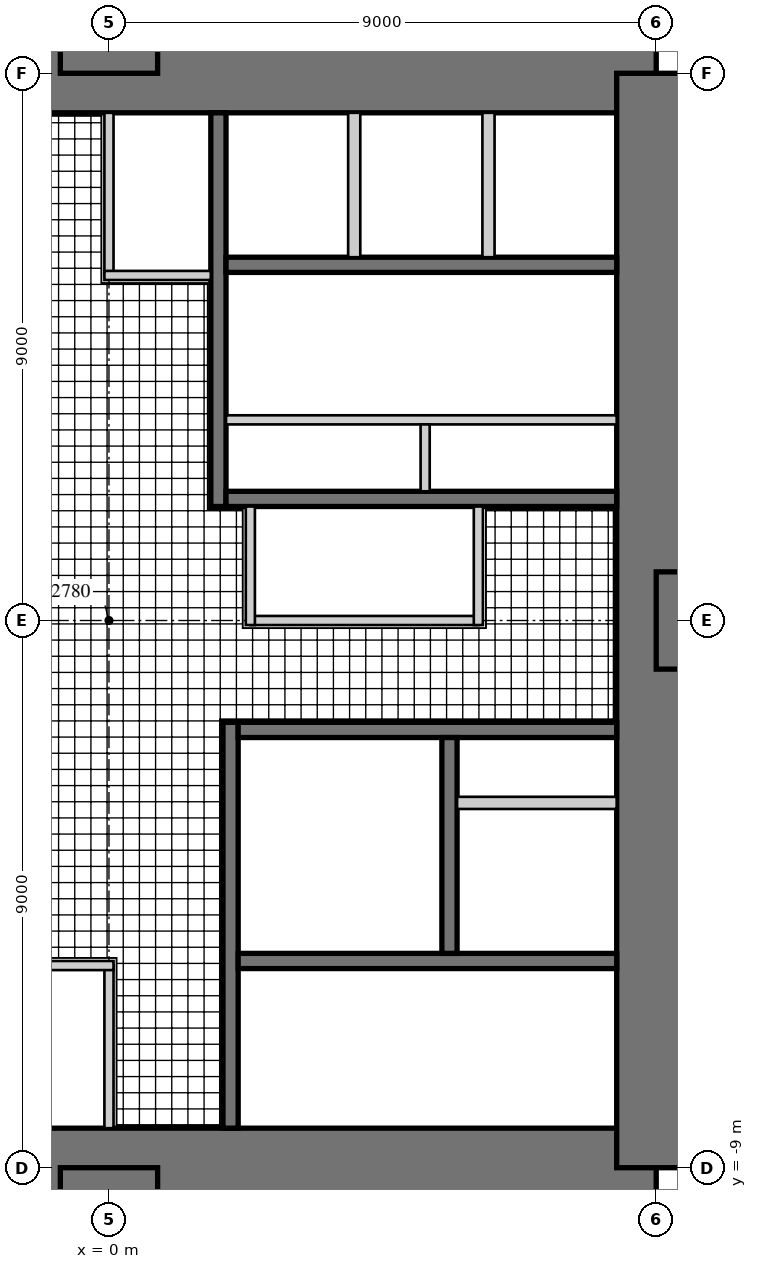
"""IFC4 building model, lengths in metres.
Left out: names, types, materials, properties, quantities, classifications, styles, units other than length and angle.
Written with IfcOpenShell. Run it as: python <this file> out.ifc"""

import sys

from ifc_helpers import new_model, si_unit, direction, frame, frame_2d, origin, place, context, subcontext, project, spatial, rectangle, extrude, element, fill, save


model = new_model("IFC4")
c1 = context("Model", 3, precision=1e-05, world=origin(), true_north=direction((0.0, 1.0)))
c2 = subcontext(c1, "Body", "Model", "MODEL_VIEW")
j1 = project(units=[si_unit("LENGTHUNIT", "METRE"), si_unit("PLANEANGLEUNIT", "RADIAN")], contexts=[c1])
p1 = place(None, origin())
s1 = spatial("IfcSite", under=j1, at=p1, CompositionType="ELEMENT")
p2 = place(p1, origin())
s2 = spatial("IfcBuilding", under=s1, at=p2, CompositionType="ELEMENT")
p3 = place(p2, frame((0.0, 0.0, 27.5)))
s3 = spatial("IfcBuildingStorey", under=s2, at=p3, CompositionType="ELEMENT", Elevation=27.5)
p4 = place(p3, frame((9.0, 9.0, 0.0), z_axis=(0.0, 0.0, 1.0), x_axis=(-1.0, 0.0, 0.0)))
e1 = element("IfcWall", 1, at=p4, inside=s3, PredefinedType="SHEAR", context=c2, shape_type="SweptSolid", body=[
    extrude(rectangle(XDim=18.0, YDim=1.3, at=frame_2d((9.0, 0.0))), origin(), (0.0, 0.0, 1.0), 4.0),
])
p5 = place(p4, frame((9.8, 0.0, 0.0)))
e2 = element("IfcOpeningElement", 2, at=p5, cuts=e1, PredefinedType="OPENING", context=c2, shape_type="SweptSolid", body=[
    extrude(rectangle(XDim=1.0, YDim=2.4, at=frame_2d((0.5, 1.2))), frame((0.0, 0.66, 0.0), z_axis=(0.0, -1.0, 0.0), x_axis=(1.0, 0.0, 0.0)), (0.0, 0.0, 1.0), 1.32),
])
p6 = place(p3, frame((-9.0, -9.0, 0.0), z_axis=(0.0, 0.0, 1.0), x_axis=(1.0, 0.0, 0.0)))
e3 = element("IfcWall", 3, at=p6, inside=s3, PredefinedType="SHEAR", context=c2, shape_type="SweptSolid", body=[
    extrude(rectangle(XDim=18.0, YDim=1.3, at=frame_2d((9.0, 0.0))), origin(), (0.0, 0.0, 1.0), 4.0),
])
p7 = place(p6, frame((9.8, 0.0, 0.0)))
e4 = element("IfcOpeningElement", 4, at=p7, cuts=e3, PredefinedType="OPENING", context=c2, shape_type="SweptSolid", body=[
    extrude(rectangle(XDim=1.0, YDim=2.4, at=frame_2d((0.5, 1.2))), frame((0.0, 0.66, 0.0), z_axis=(0.0, -1.0, 0.0), x_axis=(1.0, 0.0, 0.0)), (0.0, 0.0, 1.0), 1.32),
])
p8 = place(p3, frame((9.0, -9.0, 0.0), z_axis=(0.0, 0.0, 1.0), x_axis=(0.0, 1.0, 0.0)))
e5 = element("IfcWall", 5, at=p8, inside=s3, PredefinedType="SHEAR", context=c2, shape_type="SweptSolid", body=[
    extrude(rectangle(XDim=18.0, YDim=1.3, at=frame_2d((9.0, 0.0))), origin(), (0.0, 0.0, 1.0), 4.0),
])
p9 = place(p8, frame((9.8, 0.0, 0.0)))
e6 = element("IfcOpeningElement", 6, at=p9, cuts=e5, PredefinedType="OPENING", context=c2, shape_type="SweptSolid", body=[
    extrude(rectangle(XDim=1.0, YDim=2.4, at=frame_2d((0.5, 1.2))), frame((0.0, 0.66, 0.0), z_axis=(0.0, -1.0, 0.0), x_axis=(1.0, 0.0, 0.0)), (0.0, 0.0, 1.0), 1.32),
])
p10 = place(p3, frame((1.8, 1.875, 0.0), z_axis=(0.0, 0.0, 1.0), x_axis=(0.0, 1.0, 0.0)))
e7 = element("IfcWall", 7, at=p10, inside=s3, PredefinedType="SHEAR", context=c2, shape_type="SweptSolid", body=[
    extrude(rectangle(XDim=6.475, YDim=0.25, at=frame_2d((3.238, 0.0))), origin(), (0.0, 0.0, 1.0), 4.0),
])
p11 = place(p10, frame((1.875, 0.0, 0.0)))
e8 = element("IfcOpeningElement", 8, at=p11, cuts=e7, PredefinedType="OPENING", context=c2, shape_type="SweptSolid", body=[
    extrude(rectangle(XDim=1.6, YDim=2.4, at=frame_2d((0.8, 1.2))), frame((0.0, 0.135, 0.0), z_axis=(0.0, -1.0, 0.0), x_axis=(1.0, 0.0, 0.0)), (0.0, 0.0, 1.0), 0.27),
])
p12 = place(p3, frame((1.925, 2.0, 0.0), z_axis=(0.0, 0.0, 1.0), x_axis=(1.0, 0.0, 0.0)))
e9 = element("IfcWall", 9, at=p12, inside=s3, PredefinedType="SHEAR", context=c2, shape_type="SweptSolid", body=[
    extrude(rectangle(XDim=6.425, YDim=0.25, at=frame_2d((3.212, 0.0))), origin(), (0.0, 0.0, 1.0), 4.0),
])
p13 = place(p3, frame((1.925, 5.85, 0.0), z_axis=(0.0, 0.0, 1.0), x_axis=(1.0, 0.0, 0.0)))
e10 = element("IfcWall", 10, at=p13, inside=s3, PredefinedType="SHEAR", context=c2, shape_type="SweptSolid", body=[
    extrude(rectangle(XDim=6.425, YDim=0.25, at=frame_2d((3.212, 0.0))), origin(), (0.0, 0.0, 1.0), 4.0),
])
p14 = place(p13, frame((0.454, 0.0, 0.0)))
e11 = element("IfcOpeningElement", 11, at=p14, cuts=e10, PredefinedType="OPENING", context=c2, shape_type="SweptSolid", body=[
    extrude(rectangle(XDim=1.1, YDim=2.2, at=frame_2d((0.55, 1.1))), frame((0.0, 0.135, 0.0), z_axis=(0.0, -1.0, 0.0), x_axis=(1.0, 0.0, 0.0)), (0.0, 0.0, 1.0), 0.27),
])
p15 = place(p13, frame((2.663, 0.0, 0.0)))
e12 = element("IfcOpeningElement", 12, at=p15, cuts=e10, PredefinedType="OPENING", context=c2, shape_type="SweptSolid", body=[
    extrude(rectangle(XDim=1.1, YDim=2.2, at=frame_2d((0.55, 1.1))), frame((0.0, 0.135, 0.0), z_axis=(0.0, -1.0, 0.0), x_axis=(1.0, 0.0, 0.0)), (0.0, 0.0, 1.0), 0.27),
])
p16 = place(p13, frame((4.871, 0.0, 0.0)))
e13 = element("IfcOpeningElement", 13, at=p16, cuts=e10, PredefinedType="OPENING", context=c2, shape_type="SweptSolid", body=[
    extrude(rectangle(XDim=1.1, YDim=2.2, at=frame_2d((0.55, 1.1))), frame((0.0, 0.135, 0.0), z_axis=(0.0, -1.0, 0.0), x_axis=(1.0, 0.0, 0.0)), (0.0, 0.0, 1.0), 0.27),
])
p17 = place(p3, frame((1.925, 3.3, 0.0), z_axis=(0.0, 0.0, 1.0), x_axis=(1.0, 0.0, 0.0)))
e14 = element("IfcWall", 14, at=p17, inside=s3, PredefinedType="PARTITIONING", context=c2, shape_type="SweptSolid", body=[
    extrude(rectangle(XDim=6.425, YDim=0.15, at=frame_2d((3.212, 0.0))), origin(), (0.0, 0.0, 1.0), 4.0),
])
p18 = place(p17, frame((0.075, 0.0, 0.0)))
e15 = element("IfcOpeningElement", 15, at=p18, cuts=e14, PredefinedType="OPENING", context=c2, shape_type="SweptSolid", body=[
    extrude(rectangle(XDim=0.8, YDim=2.1, at=frame_2d((0.4, 1.05))), frame((0.0, 0.085, 0.0), z_axis=(0.0, -1.0, 0.0), x_axis=(1.0, 0.0, 0.0)), (0.0, 0.0, 1.0), 0.17),
])
p19 = place(p17, frame((3.675, 0.0, 0.0)))
e16 = element("IfcOpeningElement", 16, at=p19, cuts=e14, PredefinedType="OPENING", context=c2, shape_type="SweptSolid", body=[
    extrude(rectangle(XDim=0.8, YDim=2.1, at=frame_2d((0.4, 1.05))), frame((0.0, 0.085, 0.0), z_axis=(0.0, -1.0, 0.0), x_axis=(1.0, 0.0, 0.0)), (0.0, 0.0, 1.0), 0.17),
])
p20 = place(p3, frame((5.2, 2.125, 0.0), z_axis=(0.0, 0.0, 1.0), x_axis=(0.0, 1.0, 0.0)))
e17 = element("IfcWall", 17, at=p20, inside=s3, PredefinedType="PARTITIONING", context=c2, shape_type="SweptSolid", body=[
    extrude(rectangle(XDim=1.1, YDim=0.15, at=frame_2d((0.55, 0.0))), origin(), (0.0, 0.0, 1.0), 4.0),
])
for number, where, z_axis, x_axis in (
    (18, (4.033, 5.975, 0.0), (0.0, 0.0, 1.0), (0.0, 1.0, 0.0)),
    (19, (6.242, 5.975, 0.0), (0.0, 0.0, 1.0), (0.0, 1.0, 0.0)),
):
    element("IfcWall", number, at=place(p3, frame(where, z_axis=z_axis, x_axis=x_axis)), inside=s3, PredefinedType="PARTITIONING", context=c2, shape_type="SweptSolid", body=[
        extrude(rectangle(XDim=2.375, YDim=0.2, at=frame_2d((1.188, 0.0))), origin(), (0.0, 0.0, 1.0), 4.0),
    ])
p21 = place(p3, frame((2.0, -1.675, 0.0), z_axis=(0.0, 0.0, 1.0), x_axis=(0.0, -1.0, 0.0)))
e20 = element("IfcWall", 20, at=p21, inside=s3, PredefinedType="SHEAR", context=c2, shape_type="SweptSolid", body=[
    extrude(rectangle(XDim=6.675, YDim=0.25, at=frame_2d((3.337, 0.0))), origin(), (0.0, 0.0, 1.0), 4.0),
])
p22 = place(p21, frame((0.725, 0.0, 0.0)))
e21 = element("IfcOpeningElement", 21, at=p22, cuts=e20, PredefinedType="OPENING", context=c2, shape_type="SweptSolid", body=[
    extrude(rectangle(XDim=1.0, YDim=2.1, at=frame_2d((0.5, 1.05))), frame((0.0, 0.135, 0.0), z_axis=(0.0, -1.0, 0.0), x_axis=(1.0, 0.0, 0.0)), (0.0, 0.0, 1.0), 0.27),
])
p23 = place(p3, frame((2.125, -1.8, 0.0), z_axis=(0.0, 0.0, 1.0), x_axis=(1.0, 0.0, 0.0)))
e22 = element("IfcWall", 22, at=p23, inside=s3, PredefinedType="SHEAR", context=c2, shape_type="SweptSolid", body=[
    extrude(rectangle(XDim=6.225, YDim=0.25, at=frame_2d((3.113, 0.0))), origin(), (0.0, 0.0, 1.0), 4.0),
])
p24 = place(p3, frame((2.125, -5.6, 0.0), z_axis=(0.0, 0.0, 1.0), x_axis=(1.0, 0.0, 0.0)))
e23 = element("IfcWall", 23, at=p24, inside=s3, PredefinedType="SHEAR", context=c2, shape_type="SweptSolid", body=[
    extrude(rectangle(XDim=6.225, YDim=0.25, at=frame_2d((3.113, 0.0))), origin(), (0.0, 0.0, 1.0), 4.0),
])
p25 = place(p24, frame((0.175, 0.0, 0.0)))
e24 = element("IfcOpeningElement", 24, at=p25, cuts=e23, PredefinedType="OPENING", context=c2, shape_type="SweptSolid", body=[
    extrude(rectangle(XDim=1.0, YDim=2.1, at=frame_2d((0.5, 1.05))), frame((0.0, 0.135, 0.0), z_axis=(0.0, -1.0, 0.0), x_axis=(1.0, 0.0, 0.0)), (0.0, 0.0, 1.0), 0.27),
])
p26 = place(p3, frame((5.6, -1.925, 0.0), z_axis=(0.0, 0.0, 1.0), x_axis=(0.0, -1.0, 0.0)))
e25 = element("IfcWall", 25, at=p26, inside=s3, PredefinedType="SHEAR", context=c2, shape_type="SweptSolid", body=[
    extrude(rectangle(XDim=3.55, YDim=0.25, at=frame_2d((1.775, 0.0))), origin(), (0.0, 0.0, 1.0), 4.0),
])
p27 = place(p26, frame((1.525, 0.0, 0.0)))
e26 = element("IfcOpeningElement", 26, at=p27, cuts=e25, PredefinedType="OPENING", context=c2, shape_type="SweptSolid", body=[
    extrude(rectangle(XDim=1.1, YDim=2.2, at=frame_2d((0.55, 1.1))), frame((0.0, 0.135, 0.0), z_axis=(0.0, -1.0, 0.0), x_axis=(1.0, 0.0, 0.0)), (0.0, 0.0, 1.0), 0.27),
])
p28 = place(p26, frame((0.075, 0.0, 0.0)))
e27 = element("IfcOpeningElement", 27, at=p28, cuts=e25, PredefinedType="OPENING", context=c2, shape_type="SweptSolid", body=[
    extrude(rectangle(XDim=0.8, YDim=2.1, at=frame_2d((0.4, 1.05))), frame((0.0, 0.135, 0.0), z_axis=(0.0, -1.0, 0.0), x_axis=(1.0, 0.0, 0.0)), (0.0, 0.0, 1.0), 0.27),
])
p29 = place(p3, frame((5.725, -3.0, 0.0), z_axis=(0.0, 0.0, 1.0), x_axis=(1.0, 0.0, 0.0)))
e28 = element("IfcWall", 28, at=p29, inside=s3, PredefinedType="PARTITIONING", context=c2, shape_type="SweptSolid", body=[
    extrude(rectangle(XDim=2.625, YDim=0.2, at=frame_2d((1.312, 0.0))), origin(), (0.0, 0.0, 1.0), 4.0),
])
p30 = place(p3, frame((0.0, 9.0, 0.0), z_axis=(0.0, 0.0, 1.0), x_axis=(0.0, 1.0, 0.0)))
e29 = element("IfcWall", 29, at=p30, inside=s3, PredefinedType="SHEAR", context=c2, shape_type="SweptSolid", body=[
    extrude(rectangle(XDim=9.0, YDim=1.6, at=frame_2d((4.5, 0.0))), origin(), (0.0, 0.0, 1.0), 4.0),
])
p31 = place(p3, frame((9.0, 0.0, 0.0), z_axis=(0.0, 0.0, 1.0), x_axis=(1.0, 0.0, 0.0)))
e30 = element("IfcWall", 30, at=p31, inside=s3, PredefinedType="SHEAR", context=c2, shape_type="SweptSolid", body=[
    extrude(rectangle(XDim=18.0, YDim=1.6, at=frame_2d((9.0, 0.0))), origin(), (0.0, 0.0, 1.0), 4.0),
])
p32 = place(p31, frame((9.9, 0.0, 0.0)))
e31 = element("IfcOpeningElement", 31, at=p32, cuts=e30, PredefinedType="OPENING", context=c2, shape_type="SweptSolid", body=[
    extrude(rectangle(XDim=1.0, YDim=2.2, at=frame_2d((0.5, 1.1))), frame((0.0, 0.81, 0.0), z_axis=(0.0, -1.0, 0.0), x_axis=(1.0, 0.0, 0.0)), (0.0, 0.0, 1.0), 1.62),
])
p33 = place(p3, frame((0.0, -9.0, 0.0), z_axis=(0.0, 0.0, 1.0), x_axis=(0.0, -1.0, 0.0)))
e32 = element("IfcWall", 32, at=p33, inside=s3, PredefinedType="SHEAR", context=c2, shape_type="SweptSolid", body=[
    extrude(rectangle(XDim=18.0, YDim=1.6, at=frame_2d((9.0, 0.0))), origin(), (0.0, 0.0, 1.0), 4.0),
])
p34 = place(p33, frame((9.9, 0.0, 0.0)))
e33 = element("IfcOpeningElement", 33, at=p34, cuts=e32, PredefinedType="OPENING", context=c2, shape_type="SweptSolid", body=[
    extrude(rectangle(XDim=1.0, YDim=2.2, at=frame_2d((0.5, 1.1))), frame((0.0, 0.81, 0.0), z_axis=(0.0, -1.0, 0.0), x_axis=(1.0, 0.0, 0.0)), (0.0, 0.0, 1.0), 1.62),
])
p35 = place(p3, frame((2.325, 0.0, 0.0), z_axis=(0.0, 0.0, 1.0), x_axis=(1.0, 0.0, 0.0)))
e34 = element("IfcWall", 34, at=p35, inside=s3, PredefinedType="PARTITIONING", context=c2, shape_type="SweptSolid", body=[
    extrude(rectangle(XDim=3.75, YDim=0.15, at=frame_2d((1.875, 0.0))), origin(), (0.0, 0.0, 1.0), 3.8),
])
p36 = place(p35, frame((0.4, 0.0, 0.0)))
e35 = element("IfcOpeningElement", 35, at=p36, cuts=e34, PredefinedType="OPENING", context=c2, shape_type="SweptSolid", body=[
    extrude(rectangle(XDim=1.0, YDim=2.1, at=frame_2d((0.5, 1.05))), frame((0.0, 0.085, 0.0), z_axis=(0.0, -1.0, 0.0), x_axis=(1.0, 0.0, 0.0)), (0.0, 0.0, 1.0), 0.17),
])
for number, where, z_axis, x_axis in (
    (36, (2.325, 1.875, 0.0), (0.0, 0.0, 1.0), (0.0, -1.0, 0.0)),
    (37, (6.075, -0.075, 0.0), (0.0, 0.0, 1.0), (0.0, 1.0, 0.0)),
):
    element("IfcWall", number, at=place(p3, frame(where, z_axis=z_axis, x_axis=x_axis)), inside=s3, PredefinedType="PARTITIONING", context=c2, shape_type="SweptSolid", body=[
        extrude(rectangle(XDim=1.95, YDim=0.15, at=frame_2d((0.975, 0.0))), origin(), (0.0, 0.0, 1.0), 3.8),
    ])
p37 = place(p3, frame((0.0, 5.675, 0.0), z_axis=(0.0, 0.0, 1.0), x_axis=(0.0, 1.0, 0.0)))
e38 = element("IfcWall", 38, at=p37, inside=s3, PredefinedType="PARTITIONING", context=c2, shape_type="SweptSolid", body=[
    extrude(rectangle(XDim=2.675, YDim=0.15, at=frame_2d((1.337, 0.0))), origin(), (0.0, 0.0, 1.0), 3.8),
])
p38 = place(p37, frame((0.4, 0.0, 0.0)))
e39 = element("IfcOpeningElement", 39, at=p38, cuts=e38, PredefinedType="OPENING", context=c2, shape_type="SweptSolid", body=[
    extrude(rectangle(XDim=1.0, YDim=2.1, at=frame_2d((0.5, 1.05))), frame((0.0, 0.085, 0.0), z_axis=(0.0, -1.0, 0.0), x_axis=(1.0, 0.0, 0.0)), (0.0, 0.0, 1.0), 0.17),
])
p39 = place(p3, frame((1.675, 5.675, 0.0), z_axis=(0.0, 0.0, 1.0), x_axis=(-1.0, 0.0, 0.0)))
e40 = element("IfcWall", 40, at=p39, inside=s3, PredefinedType="PARTITIONING", context=c2, shape_type="SweptSolid", body=[
    extrude(rectangle(XDim=1.75, YDim=0.15, at=frame_2d((0.875, 0.0))), origin(), (0.0, 0.0, 1.0), 3.8),
])
p40 = place(p3, frame((0.0, -5.675, 0.0), z_axis=(0.0, 0.0, 1.0), x_axis=(0.0, -1.0, 0.0)))
e41 = element("IfcWall", 41, at=p40, inside=s3, PredefinedType="PARTITIONING", context=c2, shape_type="SweptSolid", body=[
    extrude(rectangle(XDim=2.675, YDim=0.15, at=frame_2d((1.337, 0.0))), origin(), (0.0, 0.0, 1.0), 3.8),
])
p41 = place(p40, frame((0.4, 0.0, 0.0)))
e42 = element("IfcOpeningElement", 42, at=p41, cuts=e41, PredefinedType="OPENING", context=c2, shape_type="SweptSolid", body=[
    extrude(rectangle(XDim=1.0, YDim=2.1, at=frame_2d((0.5, 1.05))), frame((0.0, 0.085, 0.0), z_axis=(0.0, -1.0, 0.0), x_axis=(1.0, 0.0, 0.0)), (0.0, 0.0, 1.0), 0.17),
])
p42 = place(p3, frame((-1.675, -5.675, 0.0), z_axis=(0.0, 0.0, 1.0), x_axis=(1.0, 0.0, 0.0)))
e43 = element("IfcWall", 43, at=p42, inside=s3, PredefinedType="PARTITIONING", context=c2, shape_type="SweptSolid", body=[
    extrude(rectangle(XDim=1.75, YDim=0.15, at=frame_2d((0.875, 0.0))), origin(), (0.0, 0.0, 1.0), 3.8),
])
p43 = place(p36, origin())
e44 = element("IfcDoor", 44, at=p43, inside=s3, OperationType="SINGLE_SWING_LEFT", PredefinedType="DOOR", context=c2, shape_type="SweptSolid", body=[
    extrude(rectangle(XDim=1.0, YDim=2.1, at=frame_2d((0.5, 1.05))), frame((0.0, 0.025, 0.0), z_axis=(0.0, -1.0, 0.0), x_axis=(1.0, 0.0, 0.0)), (0.0, 0.0, 1.0), 0.05),
])
fill(e35, e44)
p44 = place(p38, frame((1.0, 0.0, 0.0), z_axis=(0.0, 0.0, 1.0), x_axis=(-1.0, 0.0, 0.0)))
e45 = element("IfcDoor", 45, at=p44, inside=s3, OperationType="SINGLE_SWING_RIGHT", PredefinedType="DOOR", context=c2, shape_type="SweptSolid", body=[
    extrude(rectangle(XDim=1.0, YDim=2.1, at=frame_2d((0.5, 1.05))), frame((0.0, 0.025, 0.0), z_axis=(0.0, -1.0, 0.0), x_axis=(1.0, 0.0, 0.0)), (0.0, 0.0, 1.0), 0.05),
])
fill(e39, e45)
p45 = place(p41, frame((1.0, 0.0, 0.0), z_axis=(0.0, 0.0, 1.0), x_axis=(-1.0, 0.0, 0.0)))
e46 = element("IfcDoor", 46, at=p45, inside=s3, OperationType="SINGLE_SWING_RIGHT", PredefinedType="DOOR", context=c2, shape_type="SweptSolid", body=[
    extrude(rectangle(XDim=1.0, YDim=2.1, at=frame_2d((0.5, 1.05))), frame((0.0, 0.025, 0.0), z_axis=(0.0, -1.0, 0.0), x_axis=(1.0, 0.0, 0.0)), (0.0, 0.0, 1.0), 0.05),
])
fill(e42, e46)
p46 = place(p5, frame((1.0, 0.0, 0.0), z_axis=(0.0, 0.0, 1.0), x_axis=(-1.0, 0.0, 0.0)))
e47 = element("IfcDoor", 47, at=p46, inside=s3, OperationType="SINGLE_SWING_RIGHT", PredefinedType="DOOR", context=c2, shape_type="SweptSolid", body=[
    extrude(rectangle(XDim=1.0, YDim=2.4, at=frame_2d((0.5, 1.2))), frame((0.0, -0.005, 0.0), z_axis=(0.0, -1.0, 0.0), x_axis=(1.0, 0.0, 0.0)), (0.0, 0.0, 1.0), 0.05),
])
fill(e2, e47)
p47 = place(p7, frame((1.0, 0.0, 0.0), z_axis=(0.0, 0.0, 1.0), x_axis=(-1.0, 0.0, 0.0)))
e48 = element("IfcDoor", 48, at=p47, inside=s3, OperationType="SINGLE_SWING_RIGHT", PredefinedType="DOOR", context=c2, shape_type="SweptSolid", body=[
    extrude(rectangle(XDim=1.0, YDim=2.4, at=frame_2d((0.5, 1.2))), frame((0.0, -0.005, 0.0), z_axis=(0.0, -1.0, 0.0), x_axis=(1.0, 0.0, 0.0)), (0.0, 0.0, 1.0), 0.05),
])
fill(e4, e48)
p48 = place(p9, frame((1.0, 0.0, 0.0), z_axis=(0.0, 0.0, 1.0), x_axis=(-1.0, 0.0, 0.0)))
e49 = element("IfcDoor", 49, at=p48, inside=s3, OperationType="SINGLE_SWING_RIGHT", PredefinedType="DOOR", context=c2, shape_type="SweptSolid", body=[
    extrude(rectangle(XDim=1.0, YDim=2.4, at=frame_2d((0.5, 1.2))), frame((0.0, -0.005, 0.0), z_axis=(0.0, -1.0, 0.0), x_axis=(1.0, 0.0, 0.0)), (0.0, 0.0, 1.0), 0.05),
])
fill(e6, e49)
p49 = place(p14, origin())
e50 = element("IfcDoor", 50, at=p49, inside=s3, OperationType="DOUBLE_DOOR_SLIDING", PredefinedType="DOOR", context=c2, shape_type="SweptSolid", body=[
    extrude(rectangle(XDim=1.1, YDim=2.2, at=frame_2d((0.55, 1.1))), frame((0.0, 0.025, 0.0), z_axis=(0.0, -1.0, 0.0), x_axis=(1.0, 0.0, 0.0)), (0.0, 0.0, 1.0), 0.05),
])
fill(e11, e50)
p50 = place(p15, origin())
e51 = element("IfcDoor", 51, at=p50, inside=s3, OperationType="DOUBLE_DOOR_SLIDING", PredefinedType="DOOR", context=c2, shape_type="SweptSolid", body=[
    extrude(rectangle(XDim=1.1, YDim=2.2, at=frame_2d((0.55, 1.1))), frame((0.0, 0.025, 0.0), z_axis=(0.0, -1.0, 0.0), x_axis=(1.0, 0.0, 0.0)), (0.0, 0.0, 1.0), 0.05),
])
fill(e12, e51)
p51 = place(p16, origin())
e52 = element("IfcDoor", 52, at=p51, inside=s3, OperationType="DOUBLE_DOOR_SLIDING", PredefinedType="DOOR", context=c2, shape_type="SweptSolid", body=[
    extrude(rectangle(XDim=1.1, YDim=2.2, at=frame_2d((0.55, 1.1))), frame((0.0, 0.025, 0.0), z_axis=(0.0, -1.0, 0.0), x_axis=(1.0, 0.0, 0.0)), (0.0, 0.0, 1.0), 0.05),
])
fill(e13, e52)
p52 = place(p11, origin())
e53 = element("IfcDoor", 53, at=p52, inside=s3, OperationType="DOUBLE_DOOR_DOUBLE_SWING", PredefinedType="DOOR", context=c2, shape_type="SweptSolid", body=[
    extrude(rectangle(XDim=1.6, YDim=2.4, at=frame_2d((0.8, 1.2))), frame((0.0, 0.025, 0.0), z_axis=(0.0, -1.0, 0.0), x_axis=(1.0, 0.0, 0.0)), (0.0, 0.0, 1.0), 0.05),
])
fill(e8, e53)
p53 = place(p18, frame((0.8, 0.0, 0.0), z_axis=(0.0, 0.0, 1.0), x_axis=(-1.0, 0.0, 0.0)))
e54 = element("IfcDoor", 54, at=p53, inside=s3, OperationType="SINGLE_SWING_RIGHT", PredefinedType="DOOR", context=c2, shape_type="SweptSolid", body=[
    extrude(rectangle(XDim=0.8, YDim=2.1, at=frame_2d((0.4, 1.05))), frame((0.0, 0.025, 0.0), z_axis=(0.0, -1.0, 0.0), x_axis=(1.0, 0.0, 0.0)), (0.0, 0.0, 1.0), 0.05),
])
fill(e15, e54)
p54 = place(p19, frame((0.8, 0.0, 0.0), z_axis=(0.0, 0.0, 1.0), x_axis=(-1.0, 0.0, 0.0)))
e55 = element("IfcDoor", 55, at=p54, inside=s3, OperationType="SINGLE_SWING_RIGHT", PredefinedType="DOOR", context=c2, shape_type="SweptSolid", body=[
    extrude(rectangle(XDim=0.8, YDim=2.1, at=frame_2d((0.4, 1.05))), frame((0.0, 0.025, 0.0), z_axis=(0.0, -1.0, 0.0), x_axis=(1.0, 0.0, 0.0)), (0.0, 0.0, 1.0), 0.05),
])
fill(e16, e55)
p55 = place(p22, origin())
e56 = element("IfcDoor", 56, at=p55, inside=s3, OperationType="SINGLE_SWING_LEFT", PredefinedType="DOOR", context=c2, shape_type="SweptSolid", body=[
    extrude(rectangle(XDim=1.0, YDim=2.1, at=frame_2d((0.5, 1.05))), frame((0.0, 0.025, 0.0), z_axis=(0.0, -1.0, 0.0), x_axis=(1.0, 0.0, 0.0)), (0.0, 0.0, 1.0), 0.05),
])
fill(e21, e56)
p56 = place(p25, frame((1.0, 0.0, 0.0), z_axis=(0.0, 0.0, 1.0), x_axis=(-1.0, 0.0, 0.0)))
e57 = element("IfcDoor", 57, at=p56, inside=s3, OperationType="SINGLE_SWING_RIGHT", PredefinedType="DOOR", context=c2, shape_type="SweptSolid", body=[
    extrude(rectangle(XDim=1.0, YDim=2.1, at=frame_2d((0.5, 1.05))), frame((0.0, 0.025, 0.0), z_axis=(0.0, -1.0, 0.0), x_axis=(1.0, 0.0, 0.0)), (0.0, 0.0, 1.0), 0.05),
])
fill(e24, e57)
p57 = place(p27, origin())
e58 = element("IfcDoor", 58, at=p57, inside=s3, OperationType="DOUBLE_DOOR_SLIDING", PredefinedType="DOOR", context=c2, shape_type="SweptSolid", body=[
    extrude(rectangle(XDim=1.1, YDim=2.2, at=frame_2d((0.55, 1.1))), frame((0.0, 0.025, 0.0), z_axis=(0.0, -1.0, 0.0), x_axis=(1.0, 0.0, 0.0)), (0.0, 0.0, 1.0), 0.05),
])
fill(e26, e58)
p58 = place(p28, origin())
e59 = element("IfcDoor", 59, at=p58, inside=s3, OperationType="SINGLE_SWING_LEFT", PredefinedType="DOOR", context=c2, shape_type="SweptSolid", body=[
    extrude(rectangle(XDim=0.8, YDim=2.1, at=frame_2d((0.4, 1.05))), frame((0.0, 0.025, 0.0), z_axis=(0.0, -1.0, 0.0), x_axis=(1.0, 0.0, 0.0)), (0.0, 0.0, 1.0), 0.05),
])
fill(e27, e59)
save(model, sys.argv[1])
